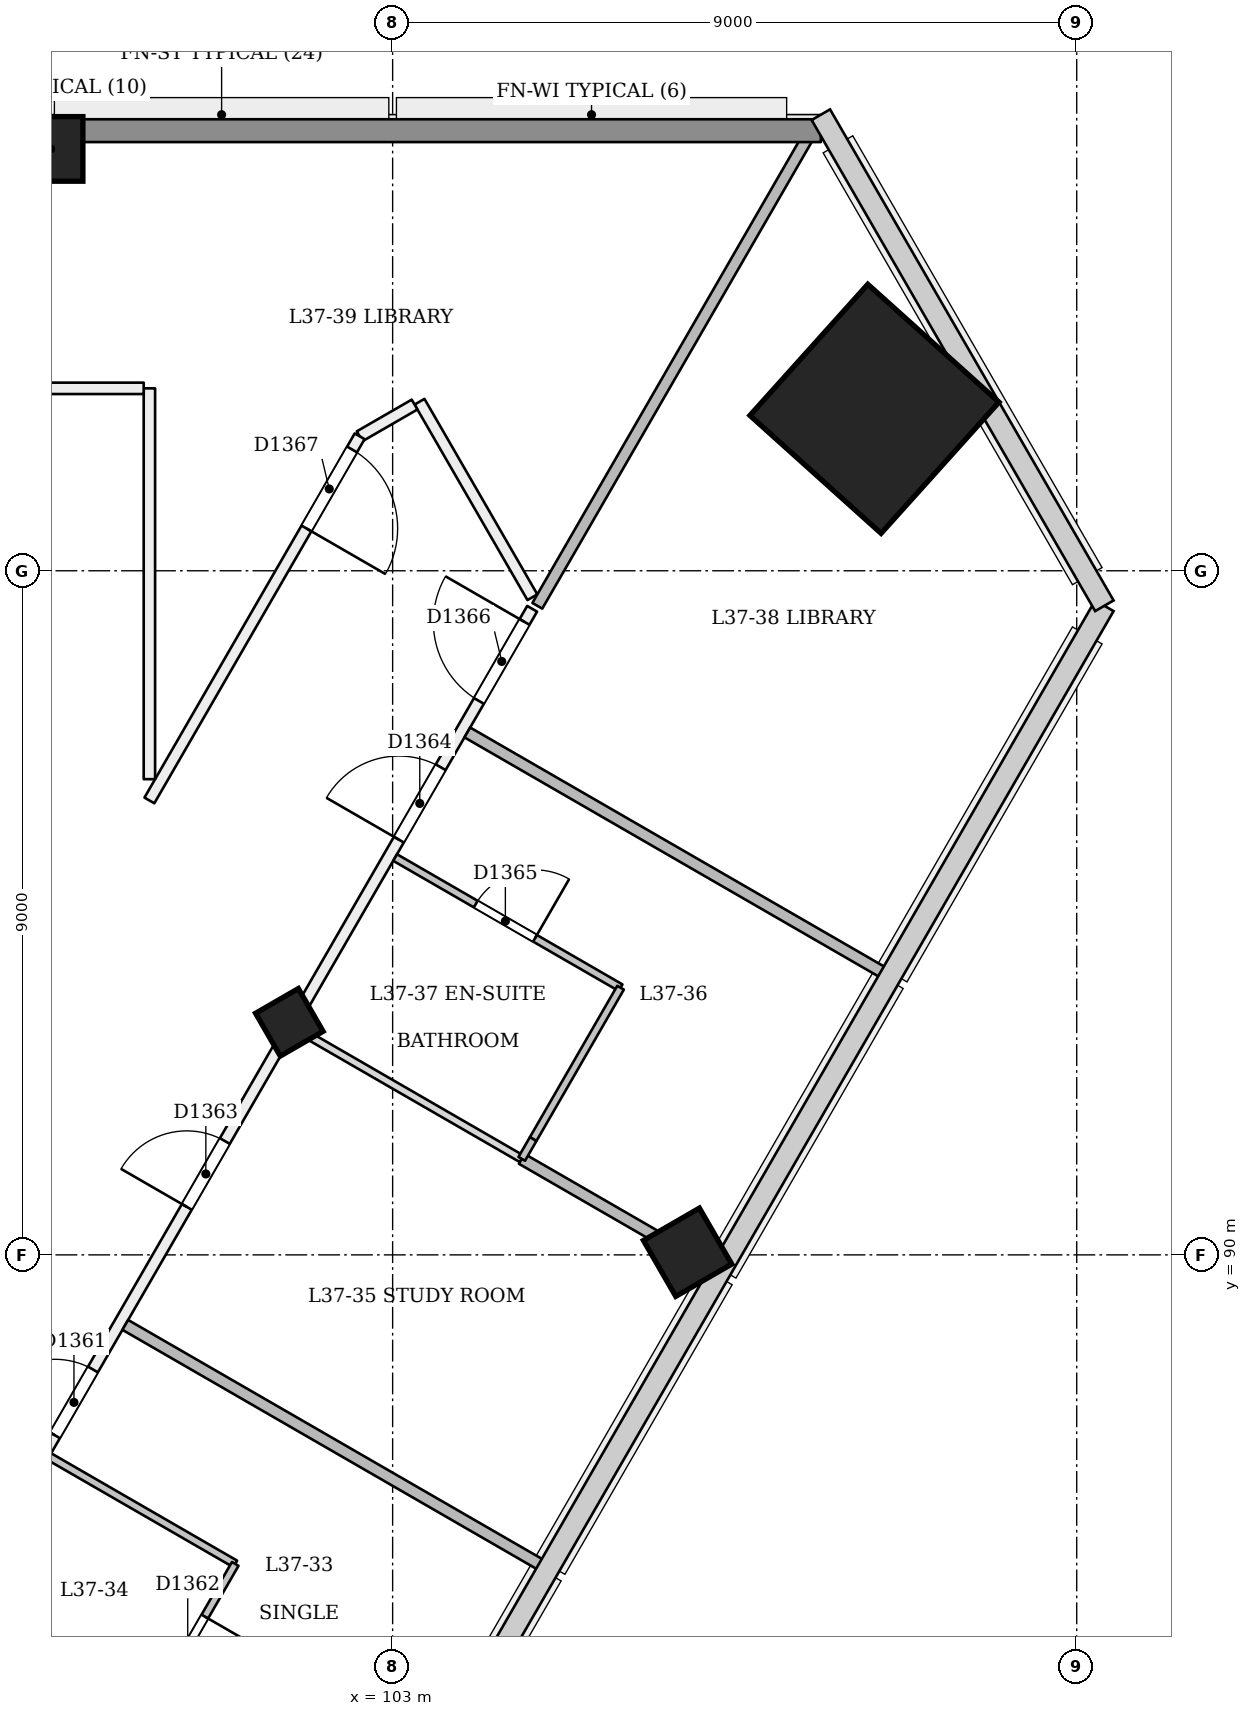
"""IFC4 building model, lengths in metres.
Left out: names, types, materials, properties, quantities, classifications, styles, units other than length and angle.
Written with IfcOpenShell. Run it as: python <this file> out.ifc"""

import sys

from ifc_helpers import new_model, si_unit, direction, frame, frame_2d, origin, origin_2d, place, context, subcontext, project, spatial, rectangle, extrude, element, fill, save


model = new_model("IFC4")
c1 = context("Model", 3, precision=1e-05, world=origin(), true_north=direction((0.0, 1.0)))
c2 = subcontext(c1, "Body", "Model", "MODEL_VIEW")
j1 = project(units=[si_unit("LENGTHUNIT", "METRE"), si_unit("PLANEANGLEUNIT", "RADIAN")], contexts=[c1])
p1 = place(None, origin())
s1 = spatial("IfcSite", under=j1, at=p1, CompositionType="ELEMENT")
p2 = place(p1, origin())
s2 = spatial("IfcBuilding", under=s1, at=p2, CompositionType="ELEMENT")
p3 = place(p2, frame((0.0, 0.0, 145.8)))
s3 = spatial("IfcBuildingStorey", under=s2, at=p3, CompositionType="ELEMENT", Elevation=145.8)
p4 = place(p3, frame((101.668, 93.013, -0.02), z_axis=(-0.022221406801, 0.038413224561, 0.999014831351), x_axis=(-0.499512940858, -0.866022219206, 0.022188685317)))
e1 = element("IfcColumn", 1, at=p4, inside=s3, PredefinedType="COLUMN", context=c2, shape_type="SweptSolid", body=[
    extrude(rectangle(XDim=0.65, YDim=0.65, at=origin_2d()), origin(), (0.0, 0.0, 1.0), 3.604),
])
p5 = place(p3, frame((109.373, 101.12, 0.0), z_axis=(-0.028403721265, 0.009287135593, 0.999553389135), x_axis=(0.498883801201, -0.866383831898, 0.022226307065)))
e2 = element("IfcColumn", 2, at=p5, inside=s3, PredefinedType="COLUMN", context=c2, shape_type="SweptSolid", body=[
    extrude(rectangle(XDim=2.32, YDim=2.32, at=origin_2d()), origin(), (0.0, 0.0, 1.0), 3.602),
])
p6 = place(p3, frame((98.5, 104.55, 0.0), z_axis=(0.0, 0.0, 1.0), x_axis=(1.0, 0.0, 0.0)))
e3 = element("IfcColumn", 3, at=p6, inside=s3, PredefinedType="COLUMN", context=c2, shape_type="SweptSolid", body=[
    extrude(rectangle(XDim=0.85, YDim=0.85, at=origin_2d()), origin(), (0.0, 0.0, 1.0), 3.6),
])
p7 = place(p3, frame((106.908, 89.987, -0.026), z_axis=(-0.02222134892, 0.038480872521, 0.999012229206), x_axis=(-0.500174577835, -0.86563950587, 0.022217955907)))
e4 = element("IfcColumn", 4, at=p7, inside=s3, PredefinedType="COLUMN", context=c2, shape_type="SweptSolid", body=[
    extrude(rectangle(XDim=0.85, YDim=0.85, at=origin_2d()), origin(), (0.0, 0.0, 1.0), 3.604),
])
p8 = place(p3, frame((85.0, 64.144, 0.0), z_axis=(0.0, 0.0, 1.0), x_axis=(0.50000053273, 0.866025096212, 0.0)))
e5 = element("IfcWall", 5, at=p8, inside=s3, PredefinedType="PARTITIONING", context=c2, shape_type="SweptSolid", body=[
    extrude(rectangle(XDim=39.671, YDim=0.15, at=frame_2d((19.835, 0.0))), origin(), (0.0, 0.0, 1.0), 2.75),
])
p9 = place(p8, frame((0.618, 0.0, 0.0)))
e6 = element("IfcOpeningElement", 6, at=p9, cuts=e5, PredefinedType="OPENING", context=c2, shape_type="SweptSolid", body=[
    extrude(rectangle(XDim=1.2, YDim=2.1, at=frame_2d((0.6, 1.05))), frame((0.0, 0.085, 0.0), z_axis=(0.0, -1.0, 0.0), x_axis=(1.0, 0.0, 0.0)), (0.0, 0.0, 1.0), 0.171),
])
p10 = place(p8, frame((9.115, 0.0, 0.0)))
e7 = element("IfcOpeningElement", 7, at=p10, cuts=e5, PredefinedType="OPENING", context=c2, shape_type="SweptSolid", body=[
    extrude(rectangle(XDim=1.0, YDim=2.1, at=frame_2d((0.5, 1.05))), frame((0.0, 0.085, 0.0), z_axis=(0.0, -1.0, 0.0), x_axis=(1.0, 0.0, 0.0)), (0.0, 0.0, 1.0), 0.171),
])
p11 = place(p8, frame((11.556, 0.0, 0.0)))
e8 = element("IfcOpeningElement", 8, at=p11, cuts=e5, PredefinedType="OPENING", context=c2, shape_type="SweptSolid", body=[
    extrude(rectangle(XDim=1.0, YDim=2.1, at=frame_2d((0.5, 1.05))), frame((0.0, 0.085, 0.0), z_axis=(0.0, -1.0, 0.0), x_axis=(1.0, 0.0, 0.0)), (0.0, 0.0, 1.0), 0.171),
])
p12 = place(p8, frame((18.115, 0.0, 0.0)))
e9 = element("IfcOpeningElement", 9, at=p12, cuts=e5, PredefinedType="OPENING", context=c2, shape_type="SweptSolid", body=[
    extrude(rectangle(XDim=1.0, YDim=2.1, at=frame_2d((0.5, 1.05))), frame((0.0, 0.085, 0.0), z_axis=(0.0, -1.0, 0.0), x_axis=(1.0, 0.0, 0.0)), (0.0, 0.0, 1.0), 0.171),
])
p13 = place(p8, frame((20.556, 0.0, 0.0)))
e10 = element("IfcOpeningElement", 10, at=p13, cuts=e5, PredefinedType="OPENING", context=c2, shape_type="SweptSolid", body=[
    extrude(rectangle(XDim=1.0, YDim=2.1, at=frame_2d((0.5, 1.05))), frame((0.0, 0.085, 0.0), z_axis=(0.0, -1.0, 0.0), x_axis=(1.0, 0.0, 0.0)), (0.0, 0.0, 1.0), 0.171),
])
p14 = place(p8, frame((27.115, 0.0, 0.0)))
e11 = element("IfcOpeningElement", 11, at=p14, cuts=e5, PredefinedType="OPENING", context=c2, shape_type="SweptSolid", body=[
    extrude(rectangle(XDim=1.0, YDim=2.1, at=frame_2d((0.5, 1.05))), frame((0.0, 0.085, 0.0), z_axis=(0.0, -1.0, 0.0), x_axis=(1.0, 0.0, 0.0)), (0.0, 0.0, 1.0), 0.171),
])
p15 = place(p8, frame((30.585, 0.0, 0.0)))
e12 = element("IfcOpeningElement", 12, at=p15, cuts=e5, PredefinedType="OPENING", context=c2, shape_type="SweptSolid", body=[
    extrude(rectangle(XDim=1.0, YDim=2.1, at=frame_2d((0.5, 1.05))), frame((0.0, 0.085, 0.0), z_axis=(0.0, -1.0, 0.0), x_axis=(1.0, 0.0, 0.0)), (0.0, 0.0, 1.0), 0.171),
])
p16 = place(p8, frame((36.164, 0.0, 0.0)))
e13 = element("IfcOpeningElement", 13, at=p16, cuts=e5, PredefinedType="OPENING", context=c2, shape_type="SweptSolid", body=[
    extrude(rectangle(XDim=1.1, YDim=2.1, at=frame_2d((0.55, 1.05))), frame((0.0, 0.085, 0.0), z_axis=(0.0, -1.0, 0.0), x_axis=(1.0, 0.0, 0.0)), (0.0, 0.0, 1.0), 0.171),
])
p17 = place(p8, frame((38.271, 0.0, 0.0)))
e14 = element("IfcOpeningElement", 14, at=p17, cuts=e5, PredefinedType="OPENING", context=c2, shape_type="SweptSolid", body=[
    extrude(rectangle(XDim=1.2, YDim=2.1, at=frame_2d((0.6, 1.05))), frame((0.0, 0.085, 0.0), z_axis=(0.0, -1.0, 0.0), x_axis=(1.0, 0.0, 0.0)), (0.0, 0.0, 1.0), 0.171),
])
p18 = place(p3, frame((104.839, 98.652, 0.0), z_axis=(0.0, 0.0, 1.0), x_axis=(-0.500002315714, 0.866024066802, 0.0)))
e15 = element("IfcWall", 15, at=p18, inside=s3, PredefinedType="PARTITIONING", context=c2, shape_type="SweptSolid", body=[
    extrude(rectangle(XDim=2.97, YDim=0.15, at=frame_2d((1.485, 0.0))), origin(), (0.0, 0.0, 1.0), 3.15),
])
p19 = place(p3, frame((103.289, 101.187, 0.0), z_axis=(0.0, 0.0, 1.0), x_axis=(-0.866019930389, -0.500009480079, 0.0)))
e16 = element("IfcWall", 16, at=p19, inside=s3, PredefinedType="PARTITIONING", context=c2, shape_type="SweptSolid", body=[
    extrude(rectangle(XDim=0.834, YDim=0.15, at=frame_2d((0.417, 0.0))), origin(), (0.0, 0.0, 1.0), 3.15),
])
p20 = place(p3, frame((102.566, 100.769, 0.0), z_axis=(0.0, 0.0, 1.0), x_axis=(-0.500002592159, -0.866023907196, 0.0)))
e17 = element("IfcWall", 17, at=p20, inside=s3, PredefinedType="PARTITIONING", context=c2, shape_type="SweptSolid", body=[
    extrude(rectangle(XDim=5.532, YDim=0.15, at=frame_2d((2.766, 0.0))), origin(), (0.0, 0.0, 1.0), 3.15),
])
p21 = place(p20, frame((0.2, 0.0, 0.0)))
e18 = element("IfcOpeningElement", 18, at=p21, cuts=e17, PredefinedType="OPENING", context=c2, shape_type="SweptSolid", body=[
    extrude(rectangle(XDim=1.2, YDim=2.1, at=frame_2d((0.6, 1.05))), frame((0.0, 0.085, 0.0), z_axis=(0.0, -1.0, 0.0), x_axis=(1.0, 0.0, 0.0)), (0.0, 0.0, 1.0), 0.171),
])
p22 = place(p3, frame((99.8, 96.258, 0.0), z_axis=(0.0, 0.0, 1.0), x_axis=(0.0, 1.0, 0.0)))
e19 = element("IfcWall", 19, at=p22, inside=s3, PredefinedType="PARTITIONING", context=c2, shape_type="SweptSolid", body=[
    extrude(rectangle(XDim=5.142, YDim=0.15, at=frame_2d((2.571, 0.0))), origin(), (0.0, 0.0, 1.0), 3.15),
])
p23 = place(p3, frame((99.725, 101.4, 0.0), z_axis=(0.0, 0.0, 1.0), x_axis=(-1.0, 0.0, 0.0)))
e20 = element("IfcWall", 20, at=p23, inside=s3, PredefinedType="PARTITIONING", context=c2, shape_type="SweptSolid", body=[
    extrude(rectangle(XDim=1.725, YDim=0.15, at=frame_2d((0.863, 0.0))), origin(), (0.0, 0.0, 1.0), 3.15),
])
p24 = place(p3, frame((99.636, 83.794, 0.0), z_axis=(0.0, 0.0, 1.0), x_axis=(-0.866042014628, 0.499971228071, 0.0)))
e21 = element("IfcWall", 21, at=p24, inside=s3, PredefinedType="PARTITIONING", context=c2, shape_type="SweptSolid", body=[
    extrude(rectangle(XDim=2.775, YDim=0.1, at=frame_2d((1.388, 0.0))), origin(), (0.0, 0.0, 1.0), 2.75),
])
p25 = place(p3, frame((98.483, 87.347, 0.0), z_axis=(0.0, 0.0, 1.0), x_axis=(0.866011447264, -0.500024172624, 0.0)))
e22 = element("IfcWall", 22, at=p25, inside=s3, PredefinedType="PARTITIONING", context=c2, shape_type="SweptSolid", body=[
    extrude(rectangle(XDim=2.825, YDim=0.1, at=frame_2d((1.413, 0.0))), origin(), (0.0, 0.0, 1.0), 3.15),
])
p26 = place(p3, frame((100.929, 85.934, 0.0), z_axis=(0.0, 0.0, 1.0), x_axis=(-0.500004234368, -0.866022959057, 0.0)))
e23 = element("IfcWall", 23, at=p26, inside=s3, PredefinedType="PARTITIONING", context=c2, shape_type="SweptSolid", body=[
    extrude(rectangle(XDim=5.0, YDim=0.1, at=frame_2d((2.5, 0.0))), origin(), (0.0, 0.0, 1.0), 2.75),
])
p27 = place(p26, frame((3.3, 0.0, 0.0)))
e24 = element("IfcOpeningElement", 24, at=p27, cuts=e23, PredefinedType="OPENING", context=c2, shape_type="SweptSolid", body=[
    extrude(rectangle(XDim=0.9, YDim=2.1, at=frame_2d((0.45, 1.05))), frame((0.0, 0.061, 0.0), z_axis=(0.0, -1.0, 0.0), x_axis=(1.0, 0.0, 0.0)), (0.0, 0.0, 1.0), 0.121),
])
p28 = place(p26, frame((0.8, 0.0, 0.0)))
e25 = element("IfcOpeningElement", 25, at=p28, cuts=e23, PredefinedType="OPENING", context=c2, shape_type="SweptSolid", body=[
    extrude(rectangle(XDim=0.9, YDim=2.1, at=frame_2d((0.45, 1.05))), frame((0.0, 0.061, 0.0), z_axis=(0.0, -1.0, 0.0), x_axis=(1.0, 0.0, 0.0)), (0.0, 0.0, 1.0), 0.121),
])
p29 = place(p3, frame((104.978, 85.906, 0.0), z_axis=(0.0, 0.0, 1.0), x_axis=(-0.866025401434, 0.500000004071, 0.0)))
e26 = element("IfcWall", 26, at=p29, inside=s3, PredefinedType="PARTITIONING", context=c2, shape_type="SweptSolid", body=[
    extrude(rectangle(XDim=6.345, YDim=0.15, at=frame_2d((3.173, 0.0))), origin(), (0.0, 0.0, 1.0), 2.65),
])
p30 = place(p3, frame((107.21, 89.813, 0.0), z_axis=(0.0, 0.0, 1.0), x_axis=(-0.866032775405, 0.499987231761, 0.0)))
e27 = element("IfcWall", 27, at=p30, inside=s3, PredefinedType="PARTITIONING", context=c2, shape_type="SweptSolid", body=[
    extrude(rectangle(XDim=2.9, YDim=0.15, at=frame_2d((1.45, 0.0))), origin(), (0.0, 0.0, 1.0), 2.65),
])
p31 = place(p3, frame((104.699, 91.263, 0.0), z_axis=(0.0, 0.0, 1.0), x_axis=(-0.866032454348, 0.499987787867, 0.0)))
e28 = element("IfcWall", 28, at=p31, inside=s3, PredefinedType="PARTITIONING", context=c2, shape_type="SweptSolid", body=[
    extrude(rectangle(XDim=3.425, YDim=0.1, at=frame_2d((1.712, 0.0))), origin(), (0.0, 0.0, 1.0), 2.75),
])
p32 = place(p3, frame((103.033, 95.228, 0.0), z_axis=(0.0, 0.0, 1.0), x_axis=(0.866032454348, -0.499987787867, 0.0)))
e29 = element("IfcWall", 29, at=p32, inside=s3, PredefinedType="PARTITIONING", context=c2, shape_type="SweptSolid", body=[
    extrude(rectangle(XDim=3.425, YDim=0.1, at=frame_2d((1.712, 0.0))), origin(), (0.0, 0.0, 1.0), 3.15),
])
p33 = place(p32, frame((1.225, 0.0, 0.0)))
e30 = element("IfcOpeningElement", 30, at=p33, cuts=e29, PredefinedType="OPENING", context=c2, shape_type="SweptSolid", body=[
    extrude(rectangle(XDim=0.9, YDim=2.1, at=frame_2d((0.45, 1.05))), frame((0.0, 0.061, 0.0), z_axis=(0.0, -1.0, 0.0), x_axis=(1.0, 0.0, 0.0)), (0.0, 0.0, 1.0), 0.121),
])
p34 = place(p3, frame((105.999, 93.515, 0.0), z_axis=(0.0, 0.0, 1.0), x_axis=(-0.499952165731, -0.866053019151, 0.0)))
e31 = element("IfcWall", 31, at=p34, inside=s3, PredefinedType="PARTITIONING", context=c2, shape_type="SweptSolid", body=[
    extrude(rectangle(XDim=2.3, YDim=0.1, at=frame_2d((1.15, 0.0))), origin(), (0.0, 0.0, 1.0), 3.15),
])
p35 = place(p3, frame((104.849, 91.523, 0.0), z_axis=(0.0, 0.0, 1.0), x_axis=(-0.500426713919, -0.865778900179, 0.0)))
e32 = element("IfcWall", 32, at=p35, inside=s3, PredefinedType="PARTITIONING", context=c2, shape_type="SweptSolid", body=[
    extrude(rectangle(XDim=0.3, YDim=0.1, at=frame_2d((0.15, 0.0))), origin(), (0.0, 0.0, 1.0), 2.75),
])
p36 = place(p3, frame((109.478, 93.7, 0.0), z_axis=(0.0, 0.0, 1.0), x_axis=(-0.866025401434, 0.500000004071, 0.0)))
e33 = element("IfcWall", 33, at=p36, inside=s3, PredefinedType="PARTITIONING", context=c2, shape_type="SweptSolid", body=[
    extrude(rectangle(XDim=6.345, YDim=0.15, at=frame_2d((3.173, 0.0))), origin(), (0.0, 0.0, 1.0), 2.65),
])
p37 = place(p3, frame((108.576, 104.9, 0.0), z_axis=(0.0, 0.0, 1.0), x_axis=(-0.4999967785, -0.866027263711, 0.0)))
e34 = element("IfcWall", 34, at=p37, inside=s3, PredefinedType="PARTITIONING", context=c2, shape_type="SweptSolid", body=[
    extrude(rectangle(XDim=7.344, YDim=0.15, at=frame_2d((3.672, 0.0))), origin(), (0.0, 0.0, 1.0), 2.65),
])
p38 = place(p3, frame((61.366, 104.79, 0.0), z_axis=(0.0, 0.0, 1.0), x_axis=(1.0, 0.0, 0.0)))
e35 = element("IfcWall", 35, at=p38, inside=s3, PredefinedType="SOLIDWALL", context=c2, shape_type="SweptSolid", body=[
    extrude(rectangle(XDim=47.268, YDim=0.3, at=frame_2d((23.634, 0.0))), origin(), (0.0, 0.0, 1.0), 2.65),
])
p39 = place(p14, origin())
e36 = element("IfcDoor", 36, at=p39, inside=s3, OperationType="SINGLE_SWING_LEFT", PredefinedType="NOTDEFINED", context=c2, shape_type="SweptSolid", body=[
    extrude(rectangle(XDim=1.0, YDim=2.1, at=frame_2d((0.5, 1.05))), frame((0.0, 0.025, 0.0), z_axis=(0.0, -1.0, 0.0), x_axis=(1.0, 0.0, 0.0)), (0.0, 0.0, 1.0), 0.05),
])
fill(e11, e36)
p40 = place(p28, origin())
e37 = element("IfcDoor", 37, at=p40, inside=s3, OperationType="SINGLE_SWING_LEFT", PredefinedType="NOTDEFINED", context=c2, shape_type="SweptSolid", body=[
    extrude(rectangle(XDim=0.9, YDim=2.1, at=frame_2d((0.45, 1.05))), frame((0.0, 0.025, 0.0), z_axis=(0.0, -1.0, 0.0), x_axis=(1.0, 0.0, 0.0)), (0.0, 0.0, 1.0), 0.05),
])
fill(e25, e37)
p41 = place(p15, origin())
e38 = element("IfcDoor", 38, at=p41, inside=s3, OperationType="SINGLE_SWING_LEFT", PredefinedType="NOTDEFINED", context=c2, shape_type="SweptSolid", body=[
    extrude(rectangle(XDim=1.0, YDim=2.1, at=frame_2d((0.5, 1.05))), frame((0.0, 0.025, 0.0), z_axis=(0.0, -1.0, 0.0), x_axis=(1.0, 0.0, 0.0)), (0.0, 0.0, 1.0), 0.05),
])
fill(e12, e38)
p42 = place(p16, origin())
e39 = element("IfcDoor", 39, at=p42, inside=s3, OperationType="SINGLE_SWING_LEFT", PredefinedType="NOTDEFINED", context=c2, shape_type="SweptSolid", body=[
    extrude(rectangle(XDim=1.1, YDim=2.1, at=frame_2d((0.55, 1.05))), frame((0.0, 0.025, 0.0), z_axis=(0.0, -1.0, 0.0), x_axis=(1.0, 0.0, 0.0)), (0.0, 0.0, 1.0), 0.05),
])
fill(e13, e39)
p43 = place(p33, origin())
e40 = element("IfcDoor", 40, at=p43, inside=s3, OperationType="SINGLE_SWING_RIGHT", PredefinedType="NOTDEFINED", context=c2, shape_type="SweptSolid", body=[
    extrude(rectangle(XDim=0.9, YDim=2.1, at=frame_2d((0.45, 1.05))), frame((0.0, 0.025, 0.0), z_axis=(0.0, -1.0, 0.0), x_axis=(1.0, 0.0, 0.0)), (0.0, 0.0, 1.0), 0.05),
])
fill(e30, e40)
p44 = place(p17, origin())
e41 = element("IfcDoor", 41, at=p44, inside=s3, OperationType="SINGLE_SWING_RIGHT", PredefinedType="NOTDEFINED", context=c2, shape_type="SweptSolid", body=[
    extrude(rectangle(XDim=1.2, YDim=2.1, at=frame_2d((0.6, 1.05))), frame((0.0, 0.025, 0.0), z_axis=(0.0, -1.0, 0.0), x_axis=(1.0, 0.0, 0.0)), (0.0, 0.0, 1.0), 0.05),
])
fill(e14, e41)
p45 = place(p21, origin())
e42 = element("IfcDoor", 42, at=p45, inside=s3, OperationType="SINGLE_SWING_RIGHT", PredefinedType="NOTDEFINED", context=c2, shape_type="SweptSolid", body=[
    extrude(rectangle(XDim=1.2, YDim=2.1, at=frame_2d((0.6, 1.05))), frame((0.0, 0.025, 0.0), z_axis=(0.0, -1.0, 0.0), x_axis=(1.0, 0.0, 0.0)), (0.0, 0.0, 1.0), 0.05),
])
fill(e18, e42)
save(model, sys.argv[1])
